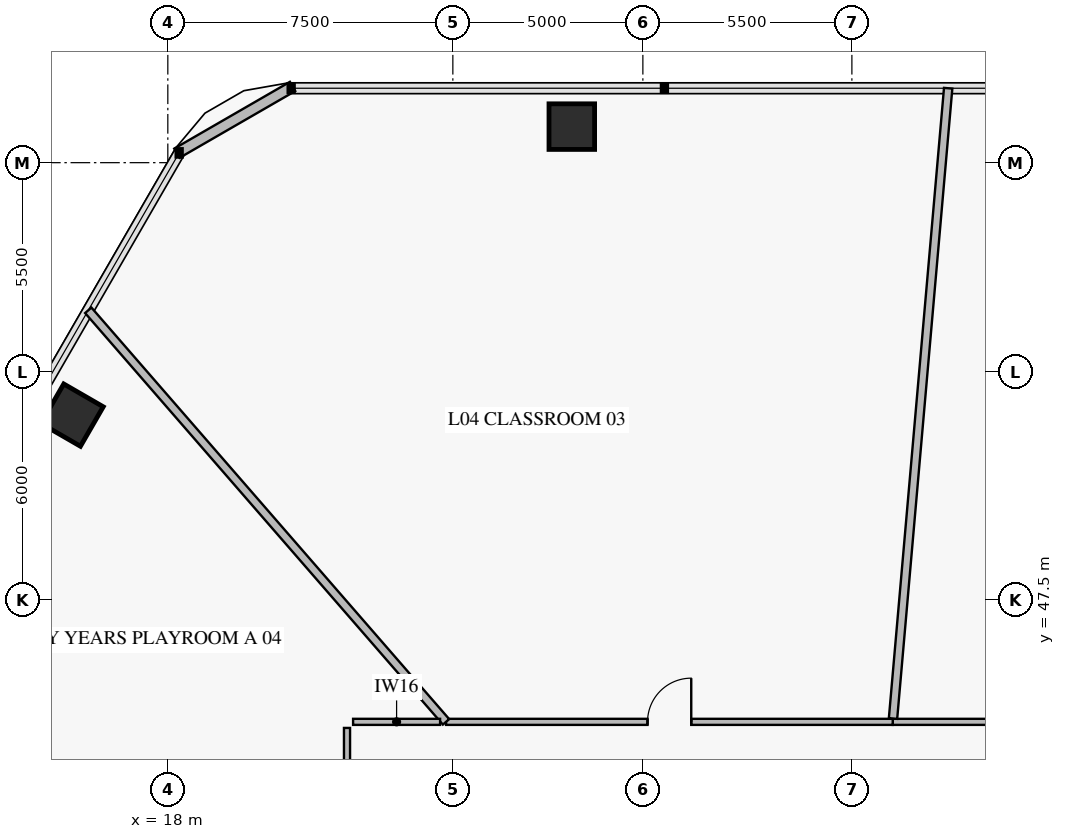
"""IFC4 building model, lengths in metres.
Left out: names, types, materials, properties, quantities, classifications, styles, units other than length and angle.
Written with IfcOpenShell. Run it as: python <this file> out.ifc"""

import sys

from ifc_helpers import new_model, si_unit, direction, frame, frame_2d, origin, origin_2d, place, context, subcontext, project, spatial, rectangle, extrude, element, fill, save


model = new_model("IFC4")
c1 = context("Model", 3, precision=1e-05, world=origin(), true_north=direction((0.0, 1.0)))
c2 = subcontext(c1, "Body", "Model", "MODEL_VIEW")
j1 = project(units=[si_unit("LENGTHUNIT", "METRE"), si_unit("PLANEANGLEUNIT", "RADIAN")], contexts=[c1])
p1 = place(None, origin())
s1 = spatial("IfcSite", under=j1, at=p1, CompositionType="ELEMENT")
p2 = place(p1, origin())
s2 = spatial("IfcBuilding", under=s1, at=p2, CompositionType="ELEMENT")
p3 = place(p2, frame((0.0, 0.0, 16.2)))
s3 = spatial("IfcBuildingStorey", under=s2, at=p3, CompositionType="ELEMENT", Elevation=16.2)
for number, where, z_axis, x_axis in (
    (1, (28.63, 59.948, 0.0), (0.0, 0.0, 1.0), (-1.0, 0.0, 0.0)),
    (2, (15.481, 52.357, 0.0), (0.0, 0.0, 1.0), (-0.5, -0.866, 0.0)),
):
    element("IfcColumn", number, at=place(p3, frame(where, z_axis=z_axis, x_axis=x_axis)), inside=s3, PredefinedType="COLUMN", context=c2, shape_type="SweptSolid", body=[
        extrude(rectangle(XDim=1.2, YDim=1.2, at=origin_2d()), origin(), (0.0, 0.0, 1.0), 3.92),
    ])
p4 = place(p3, frame((18.239, 59.249, 0.0), z_axis=(0.0, 0.0, 1.0), x_axis=(0.866007452331, 0.500031091541, 0.0)))
e3 = element("IfcWall", 3, at=p4, inside=s3, PredefinedType="SOLIDWALL", context=c2, shape_type="SweptSolid", body=[
    extrude(rectangle(XDim=3.515, YDim=0.28, at=frame_2d((1.757, 0.0))), origin(), (0.0, 0.0, 1.0), 3.92),
])
p5 = place(p3, frame((43.978, 44.285, 0.0), z_axis=(0.0, 0.0, 1.0), x_axis=(-1.0, 0.0, 0.0)))
e4 = element("IfcWall", 4, at=p5, inside=s3, PredefinedType="PARTITIONING", context=c2, shape_type="SweptSolid", body=[
    extrude(rectangle(XDim=6.903, YDim=0.16, at=frame_2d((3.452, 0.0))), origin(), (0.0, 0.0, 1.0), 3.22),
])
p6 = place(p5, frame((2.877, 0.0, 0.0)))
e5 = element("IfcOpeningElement", 5, at=p6, cuts=e4, PredefinedType="OPENING", context=c2, shape_type="SweptSolid", body=[
    extrude(rectangle(XDim=1.15, YDim=2.2, at=frame_2d((0.575, 1.1))), frame((0.0, 0.092, 0.0), z_axis=(0.0, -1.0, 0.0), x_axis=(1.0, 0.0, 0.0)), (0.0, 0.0, 1.0), 0.184),
])
p7 = place(p3, frame((37.075, 44.285, 0.0), z_axis=(0.0, 0.0, 1.0), x_axis=(-1.0, 0.0, 0.0)))
e6 = element("IfcWall", 6, at=p7, inside=s3, PredefinedType="PARTITIONING", context=c2, shape_type="SweptSolid", body=[
    extrude(rectangle(XDim=11.754, YDim=0.16, at=frame_2d((5.877, 0.0))), origin(), (0.0, 0.0, 1.0), 3.22),
])
p8 = place(p7, frame((5.302, 0.0, 0.0)))
e7 = element("IfcOpeningElement", 7, at=p8, cuts=e6, PredefinedType="OPENING", context=c2, shape_type="SweptSolid", body=[
    extrude(rectangle(XDim=1.15, YDim=2.2, at=frame_2d((0.575, 1.1))), frame((0.0, 0.092, 0.0), z_axis=(0.0, -1.0, 0.0), x_axis=(1.0, 0.0, 0.0)), (0.0, 0.0, 1.0), 0.184),
])
p9 = place(p3, frame((22.715, 44.125, 0.0), z_axis=(0.0, 0.0, 1.0), x_axis=(0.0, -1.0, 0.0)))
e8 = element("IfcWall", 8, at=p9, inside=s3, PredefinedType="PARTITIONING", context=c2, shape_type="SweptSolid", body=[
    extrude(rectangle(XDim=5.93, YDim=0.16, at=frame_2d((2.965, 0.0))), origin(), (0.0, 0.0, 1.0), 3.92),
])
p10 = place(p9, frame((2.39, 0.0, 0.0)))
e9 = element("IfcOpeningElement", 9, at=p10, cuts=e8, PredefinedType="OPENING", context=c2, shape_type="SweptSolid", body=[
    extrude(rectangle(XDim=1.15, YDim=2.2, at=frame_2d((0.575, 1.1))), frame((0.0, 0.092, 0.0), z_axis=(0.0, -1.0, 0.0), x_axis=(1.0, 0.0, 0.0)), (0.0, 0.0, 1.0), 0.184),
])
p11 = place(p3, frame((37.083, 44.373, 0.0), z_axis=(0.0, 0.0, 1.0), x_axis=(0.087149123156, 0.996195277209, 0.0)))
e10 = element("IfcWall", 10, at=p11, inside=s3, PredefinedType="PARTITIONING", context=c2, shape_type="SweptSolid", body=[
    extrude(rectangle(XDim=16.649, YDim=0.22, at=frame_2d((8.324, 0.0))), origin(), (0.0, 0.0, 1.0), 3.17),
])
p12 = place(p3, frame((25.321, 44.285, 0.0), z_axis=(0.0, 0.0, 1.0), x_axis=(-0.656060762546, 0.754708073263, 0.0)))
e11 = element("IfcWall", 11, at=p12, inside=s3, PredefinedType="PARTITIONING", context=c2, shape_type="SweptSolid", body=[
    extrude(rectangle(XDim=14.349, YDim=0.22, at=frame_2d((7.175, 0.0))), origin(), (0.0, 0.0, 1.0), 3.17),
])
p13 = place(p3, frame((22.627, 38.236, 0.0), z_axis=(0.0, 0.0, 1.0), x_axis=(-0.906309468756, 0.422614655263, 0.0)))
e12 = element("IfcWall", 12, at=p13, inside=s3, PredefinedType="PARTITIONING", context=c2, shape_type="SweptSolid", body=[
    extrude(rectangle(XDim=14.313, YDim=0.22, at=frame_2d((7.157, 0.0))), origin(), (0.0, 0.0, 1.0), 3.17),
])
p14 = place(p3, frame((25.164, 44.285, 0.0), z_axis=(0.0, 0.0, 1.0), x_axis=(-1.0, 0.0, 0.0)))
e13 = element("IfcWall", 13, at=p14, inside=s3, PredefinedType="PARTITIONING", context=c2, shape_type="SweptSolid", body=[
    extrude(rectangle(XDim=2.289, YDim=0.16, at=frame_2d((1.145, 0.0))), origin(), (0.0, 0.0, 1.0), 3.22),
])
p15 = place(p8, frame((1.15, 0.0, 0.0), z_axis=(0.0, 0.0, 1.0), x_axis=(-1.0, 0.0, 0.0)))
e14 = element("IfcDoor", 14, at=p15, inside=s3, OperationType="SINGLE_SWING_RIGHT", PredefinedType="DOOR", context=c2, shape_type="SweptSolid", body=[
    extrude(rectangle(XDim=1.15, YDim=2.2, at=frame_2d((0.575, 1.1))), frame((0.0, 0.025, 0.0), z_axis=(0.0, -1.0, 0.0), x_axis=(1.0, 0.0, 0.0)), (0.0, 0.0, 1.0), 0.05),
])
fill(e7, e14)
save(model, sys.argv[1])
